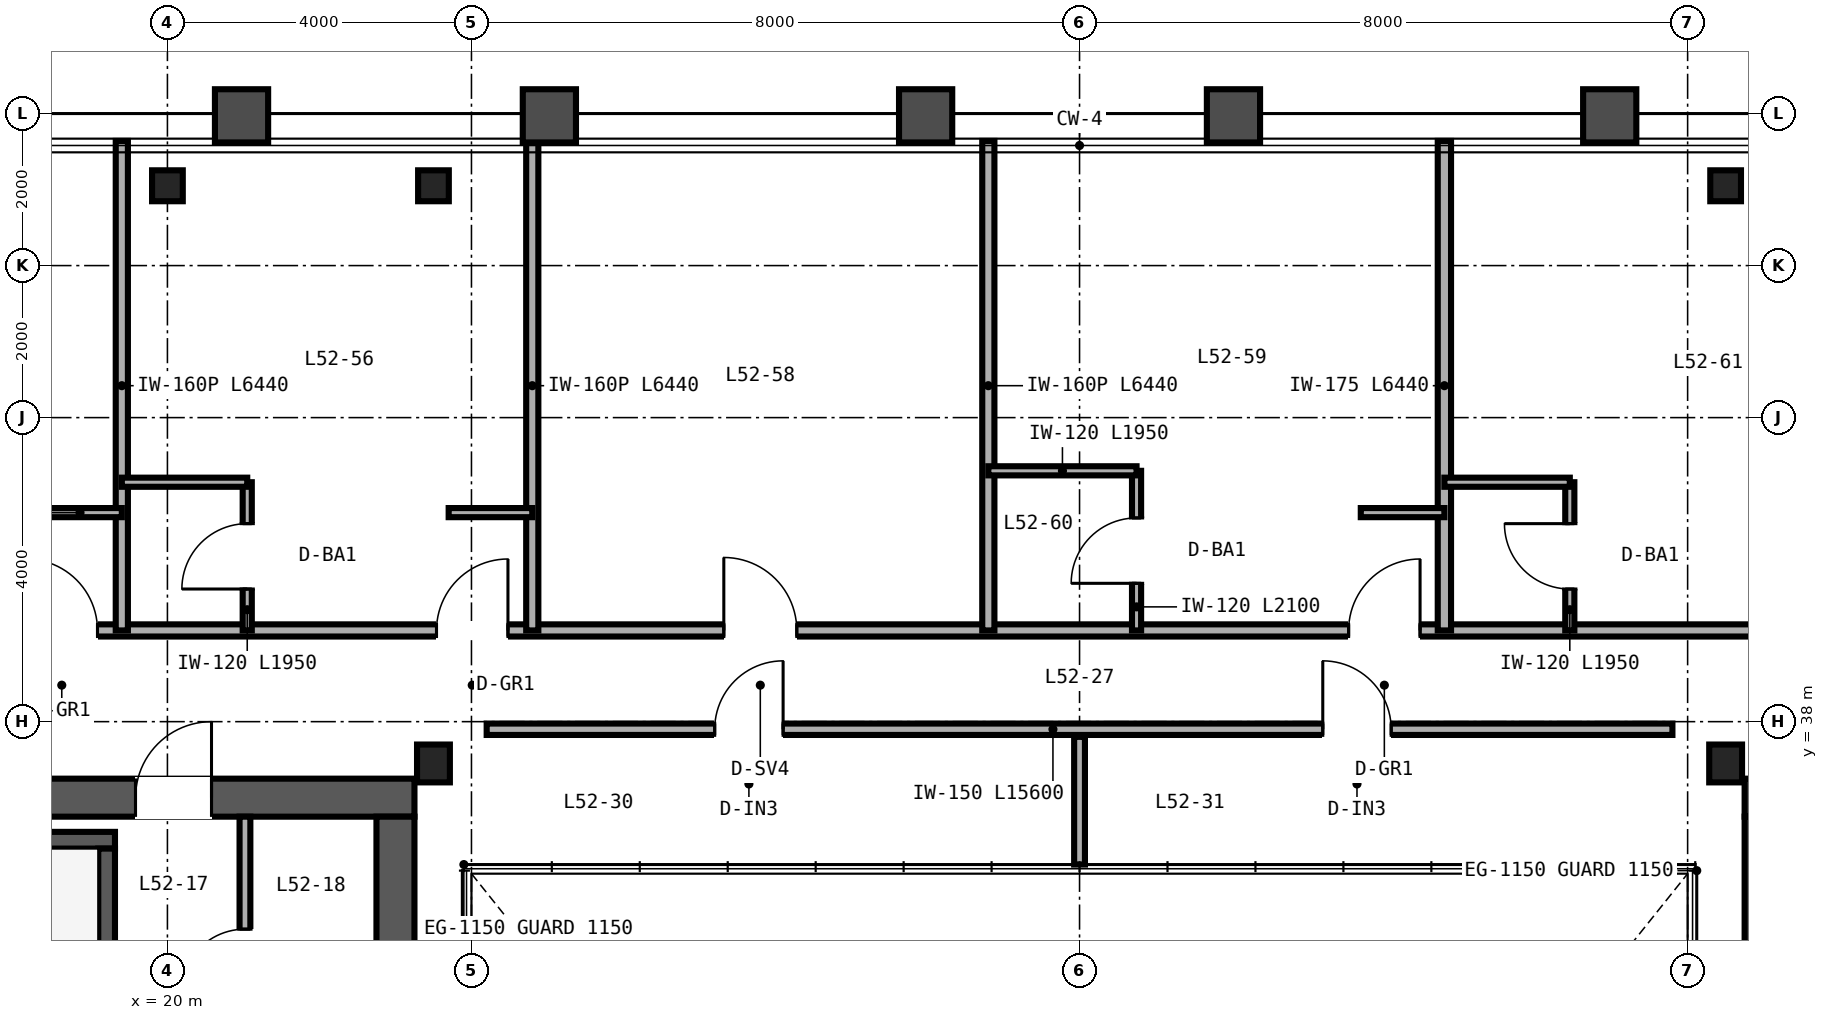
"""IFC4 building model, lengths in metres.
Left out: names, types, materials, properties, quantities, classifications, styles, units other than length and angle.
Written with IfcOpenShell. Run it as: python <this file> out.ifc"""

import sys

from ifc_helpers import new_model, si_unit, direction, frame, frame_2d, origin, origin_2d, place, context, subcontext, project, spatial, rectangle, i_section, extrude, source, transform, mapped, element, fill, save


model = new_model("IFC4")
c1 = context("Model", 3, precision=1e-05, world=origin(), true_north=direction((0.0, 1.0)))
c2 = subcontext(c1, "Body", "Model", "MODEL_VIEW")
j1 = project(units=[si_unit("LENGTHUNIT", "METRE"), si_unit("PLANEANGLEUNIT", "RADIAN")], contexts=[c1])
p1 = place(None, origin())
s1 = spatial("IfcSite", under=j1, at=p1, CompositionType="ELEMENT")
p2 = place(p1, origin())
s2 = spatial("IfcBuilding", under=s1, at=p2, CompositionType="ELEMENT")
p3 = place(p2, frame((0.0, 0.0, 206.4)))
s3 = spatial("IfcBuildingStorey", under=s2, at=p3, CompositionType="ELEMENT", Elevation=206.4)
p4 = place(p3, frame((10.75, 37.0, 0.0), z_axis=(0.0, 0.0, 1.0), x_axis=(1.0, 0.0, 0.0)))
e1 = element("IfcWall", 1, at=p4, inside=s3, PredefinedType="SHEAR", context=c2, shape_type="SweptSolid", body=[
    extrude(rectangle(XDim=12.5, YDim=0.5, at=frame_2d((6.25, 0.0))), origin(), (0.0, 0.0, 1.0), 3.37),
])
p5 = place(p4, frame((8.83, 0.0, 0.0)))
e2 = element("IfcOpeningElement", 2, at=p5, cuts=e1, PredefinedType="OPENING", context=c2, shape_type="SweptSolid", body=[
    extrude(rectangle(XDim=1.0, YDim=2.15, at=frame_2d((0.5, 1.075))), frame((0.0, 0.26, 0.0), z_axis=(0.0, -1.0, 0.0), x_axis=(1.0, 0.0, 0.0)), (0.0, 0.0, 1.0), 0.52),
])
p6 = place(p3, frame((23.0, 15.25, 0.0), z_axis=(0.0, 0.0, 1.0), x_axis=(0.0, 1.0, 0.0)))
e3 = element("IfcWall", 3, at=p6, inside=s3, PredefinedType="SHEAR", context=c2, shape_type="SweptSolid", body=[
    extrude(rectangle(XDim=21.5, YDim=0.5, at=frame_2d((10.75, 0.0))), origin(), (0.0, 0.0, 1.0), 3.37),
])
p7 = place(p3, frame((40.75, 37.0, 0.0), z_axis=(0.0, 0.0, 1.0), x_axis=(1.0, 0.0, 0.0)))
e4 = element("IfcWall", 4, at=p7, inside=s3, PredefinedType="SHEAR", context=c2, shape_type="SweptSolid", body=[
    extrude(rectangle(XDim=12.5, YDim=0.5, at=frame_2d((6.25, 0.0))), origin(), (0.0, 0.0, 1.0), 3.37),
])
p8 = place(p7, frame((9.95, 0.0, 0.0)))
e5 = element("IfcOpeningElement", 5, at=p8, cuts=e4, PredefinedType="OPENING", context=c2, shape_type="SweptSolid", body=[
    extrude(rectangle(XDim=1.1, YDim=2.15, at=frame_2d((0.55, 1.075))), frame((0.0, 0.26, 0.0), z_axis=(0.0, -1.0, 0.0), x_axis=(1.0, 0.0, 0.0)), (0.0, 0.0, 1.0), 0.52),
])
p9 = place(p3, frame((41.0, 15.25, 0.0), z_axis=(0.0, 0.0, 1.0), x_axis=(0.0, 1.0, 0.0)))
e6 = element("IfcWall", 6, at=p9, inside=s3, PredefinedType="SHEAR", context=c2, shape_type="SweptSolid", body=[
    extrude(rectangle(XDim=21.5, YDim=0.5, at=frame_2d((10.75, 0.0))), origin(), (0.0, 0.0, 1.0), 3.37),
])
p10 = place(p3, frame((11.25, 36.44, 0.0), z_axis=(0.0, 0.0, 1.0), x_axis=(1.0, 0.0, 0.0)))
e7 = element("IfcWall", 7, at=p10, inside=s3, PredefinedType="SHEAR", context=c2, shape_type="SweptSolid", body=[
    extrude(rectangle(XDim=8.06, YDim=0.22, at=frame_2d((4.03, 0.0))), origin(), (0.0, 0.0, 1.0), 3.4),
])
p11 = place(p3, frame((19.2, 33.05, 0.0), z_axis=(0.0, 0.0, 1.0), x_axis=(0.0, 1.0, 0.0)))
e8 = element("IfcWall", 8, at=p11, inside=s3, PredefinedType="SHEAR", context=c2, shape_type="SweptSolid", body=[
    extrude(rectangle(XDim=3.28, YDim=0.22, at=frame_2d((1.64, 0.0))), origin(), (0.0, 0.0, 1.0), 3.4),
])
m1 = source(origin(), c2, "Body", "SweptSolid", [
    extrude(i_section(OverallWidth=0.432, OverallDepth=0.498, WebThickness=0.056, FlangeThickness=0.089, FilletRadius=0.025, at=origin_2d()), origin(), (0.0, 0.0, 1.0), 3.37),
])
for number, where, z_axis, x_axis in (
    (9, (23.5, 37.45, 0.0), (0.0, 0.0, 1.0), (1.0, 0.0, 0.0)),
    (10, (40.5, 37.45, 0.0), (0.0, 0.0, 1.0), (1.0, 0.0, 0.0)),
):
    element("IfcColumn", number, at=place(p3, frame(where, z_axis=z_axis, x_axis=x_axis)), inside=s3, PredefinedType="COLUMN", context=c2, shape_type="MappedRepresentation", body=[
        mapped(m1, transform((0.0, 0.0, 0.0), scale=1.0)),
    ])
m2 = source(origin(), c2, "Body", "SweptSolid", [
    extrude(i_section(OverallWidth=0.404, OverallDepth=0.407, WebThickness=0.027, FlangeThickness=0.044, FilletRadius=0.025, at=origin_2d()), origin(), (0.0, 0.0, 1.0), 3.37),
])
for number, where, z_axis, x_axis in (
    (11, (20.0, 45.05, 0.0), (0.0, 0.0, 1.0), (1.0, 0.0, 0.0)),
    (12, (23.5, 45.05, 0.0), (0.0, 0.0, 1.0), (1.0, 0.0, 0.0)),
    (13, (40.5, 45.05, 0.0), (0.0, 0.0, 1.0), (1.0, 0.0, 0.0)),
):
    element("IfcColumn", number, at=place(p3, frame(where, z_axis=z_axis, x_axis=x_axis)), inside=s3, PredefinedType="COLUMN", context=c2, shape_type="MappedRepresentation", body=[
        mapped(m2, transform((0.0, 0.0, 0.0), scale=1.0)),
    ])
p12 = place(p3, frame((21.02, 33.28, 0.0), z_axis=(0.0, 0.0, 1.0), x_axis=(0.0, 1.0, 0.0)))
e14 = element("IfcWall", 14, at=p12, inside=s3, PredefinedType="PARTITIONING", context=c2, shape_type="SweptSolid", body=[
    extrude(rectangle(XDim=3.47, YDim=0.142, at=frame_2d((1.735, 0.0))), origin(), (0.0, 0.0, 1.0), 3.37),
])
p13 = place(p12, frame((1.15, 0.0, 0.0)))
e15 = element("IfcOpeningElement", 15, at=p13, cuts=e14, PredefinedType="OPENING", context=c2, shape_type="SweptSolid", body=[
    extrude(rectangle(XDim=0.84, YDim=2.1, at=frame_2d((0.42, 1.05))), frame((0.0, 0.081, 0.0), z_axis=(0.0, -1.0, 0.0), x_axis=(1.0, 0.0, 0.0)), (0.0, 0.0, 1.0), 0.162),
])
p14 = place(p3, frame((24.2, 37.9, 0.0), z_axis=(0.0, 0.0, 1.0), x_axis=(1.0, 0.0, 0.0)))
e16 = element("IfcWall", 16, at=p14, inside=s3, PredefinedType="PARTITIONING", context=c2, shape_type="SweptSolid", body=[
    extrude(rectangle(XDim=15.6, YDim=0.15, at=frame_2d((7.8, 0.0))), origin(), (0.0, 0.0, 1.0), 3.37),
])
p15 = place(p14, frame((3.0, 0.0, 0.0)))
e17 = element("IfcOpeningElement", 17, at=p15, cuts=e16, PredefinedType="OPENING", context=c2, shape_type="SweptSolid", body=[
    extrude(rectangle(XDim=0.9, YDim=2.15, at=frame_2d((0.45, 1.075))), frame((0.0, 0.085, 0.0), z_axis=(0.0, -1.0, 0.0), x_axis=(1.0, 0.0, 0.0)), (0.0, 0.0, 1.0), 0.17),
])
p16 = place(p14, frame((11.0, 0.0, 0.0)))
e18 = element("IfcOpeningElement", 18, at=p16, cuts=e16, PredefinedType="OPENING", context=c2, shape_type="SweptSolid", body=[
    extrude(rectangle(XDim=0.9, YDim=2.15, at=frame_2d((0.45, 1.075))), frame((0.0, 0.085, 0.0), z_axis=(0.0, -1.0, 0.0), x_axis=(1.0, 0.0, 0.0)), (0.0, 0.0, 1.0), 0.17),
])
p17 = place(p3, frame((32.0, 36.12, 0.0), z_axis=(0.0, 0.0, 1.0), x_axis=(0.0, 1.0, 0.0)))
e19 = element("IfcWall", 19, at=p17, inside=s3, PredefinedType="PARTITIONING", context=c2, shape_type="SweptSolid", body=[
    extrude(rectangle(XDim=1.68, YDim=0.142, at=frame_2d((0.84, 0.0))), origin(), (0.0, 0.0, 1.0), 3.37),
])
p18 = place(p3, frame((14.0, 39.2, 0.0), z_axis=(0.0, 0.0, 1.0), x_axis=(1.0, 0.0, 0.0)))
e20 = element("IfcWall", 20, at=p18, inside=s3, PredefinedType="PARTITIONING", context=c2, shape_type="SweptSolid", body=[
    extrude(rectangle(XDim=36.0, YDim=0.16, at=frame_2d((18.0, 0.0))), origin(), (0.0, 0.0, 1.0), 2.913),
])
p19 = place(p18, frame((4.14, 0.0, 0.0)))
e21 = element("IfcOpeningElement", 21, at=p19, cuts=e20, PredefinedType="OPENING", context=c2, shape_type="SweptSolid", body=[
    extrude(rectangle(XDim=0.94, YDim=2.15, at=frame_2d((0.47, 1.075))), frame((0.0, 0.09, 0.0), z_axis=(0.0, -1.0, 0.0), x_axis=(1.0, 0.0, 0.0)), (0.0, 0.0, 1.0), 0.18),
])
p20 = place(p18, frame((9.54, 0.0, 0.0)))
e22 = element("IfcOpeningElement", 22, at=p20, cuts=e20, PredefinedType="OPENING", context=c2, shape_type="SweptSolid", body=[
    extrude(rectangle(XDim=0.94, YDim=2.15, at=frame_2d((0.47, 1.075))), frame((0.0, 0.09, 0.0), z_axis=(0.0, -1.0, 0.0), x_axis=(1.0, 0.0, 0.0)), (0.0, 0.0, 1.0), 0.18),
])
p21 = place(p18, frame((13.32, 0.0, 0.0)))
e23 = element("IfcOpeningElement", 23, at=p21, cuts=e20, PredefinedType="OPENING", context=c2, shape_type="SweptSolid", body=[
    extrude(rectangle(XDim=0.96, YDim=2.15, at=frame_2d((0.48, 1.075))), frame((0.0, 0.09, 0.0), z_axis=(0.0, -1.0, 0.0), x_axis=(1.0, 0.0, 0.0)), (0.0, 0.0, 1.0), 0.18),
])
p22 = place(p18, frame((21.54, 0.0, 0.0)))
e24 = element("IfcOpeningElement", 24, at=p22, cuts=e20, PredefinedType="OPENING", context=c2, shape_type="SweptSolid", body=[
    extrude(rectangle(XDim=0.94, YDim=2.15, at=frame_2d((0.47, 1.075))), frame((0.0, 0.09, 0.0), z_axis=(0.0, -1.0, 0.0), x_axis=(1.0, 0.0, 0.0)), (0.0, 0.0, 1.0), 0.18),
])
p23 = place(p18, frame((28.14, 0.0, 0.0)))
e25 = element("IfcOpeningElement", 25, at=p23, cuts=e20, PredefinedType="OPENING", context=c2, shape_type="SweptSolid", body=[
    extrude(rectangle(XDim=0.94, YDim=2.15, at=frame_2d((0.47, 1.075))), frame((0.0, 0.09, 0.0), z_axis=(0.0, -1.0, 0.0), x_axis=(1.0, 0.0, 0.0)), (0.0, 0.0, 1.0), 0.18),
])
p24 = place(p18, frame((34.74, 0.0, 0.0)))
e26 = element("IfcOpeningElement", 26, at=p24, cuts=e20, PredefinedType="OPENING", context=c2, shape_type="SweptSolid", body=[
    extrude(rectangle(XDim=0.94, YDim=2.15, at=frame_2d((0.47, 1.075))), frame((0.0, 0.09, 0.0), z_axis=(0.0, -1.0, 0.0), x_axis=(1.0, 0.0, 0.0)), (0.0, 0.0, 1.0), 0.18),
])
p25 = place(p3, frame((19.4, 39.2, 0.0), z_axis=(0.0, 0.0, 1.0), x_axis=(0.0, 1.0, 0.0)))
e27 = element("IfcWall", 27, at=p25, inside=s3, PredefinedType="PARTITIONING", context=c2, shape_type="SweptSolid", body=[
    extrude(rectangle(XDim=6.44, YDim=0.16, at=frame_2d((3.22, 0.0))), origin(), (0.0, 0.0, 1.0), 2.677),
])
p26 = place(p3, frame((18.3, 40.75, 0.0), z_axis=(0.0, 0.0, 1.0), x_axis=(1.0, 0.0, 0.0)))
e28 = element("IfcWall", 28, at=p26, inside=s3, PredefinedType="PARTITIONING", context=c2, shape_type="SweptSolid", body=[
    extrude(rectangle(XDim=1.1, YDim=0.12, at=frame_2d((0.55, 0.0))), origin(), (0.0, 0.0, 1.0), 3.37),
])
p27 = place(p3, frame((24.8, 39.2, 0.0), z_axis=(0.0, 0.0, 1.0), x_axis=(0.0, 1.0, 0.0)))
e29 = element("IfcWall", 29, at=p27, inside=s3, PredefinedType="PARTITIONING", context=c2, shape_type="SweptSolid", body=[
    extrude(rectangle(XDim=6.44, YDim=0.16, at=frame_2d((3.22, 0.0))), origin(), (0.0, 0.0, 1.0), 2.443),
])
p28 = place(p3, frame((21.05, 39.2, 0.0), z_axis=(0.0, 0.0, 1.0), x_axis=(0.0, 1.0, 0.0)))
e30 = element("IfcWall", 30, at=p28, inside=s3, PredefinedType="PARTITIONING", context=c2, shape_type="SweptSolid", body=[
    extrude(rectangle(XDim=1.95, YDim=0.12, at=frame_2d((0.975, 0.0))), origin(), (0.0, 0.0, 1.0), 3.37),
])
p29 = place(p28, frame((0.545, 0.0, 0.0)))
e31 = element("IfcOpeningElement", 31, at=p29, cuts=e30, PredefinedType="OPENING", context=c2, shape_type="SweptSolid", body=[
    extrude(rectangle(XDim=0.86, YDim=2.1, at=frame_2d((0.43, 1.05))), frame((0.0, 0.07, 0.0), z_axis=(0.0, -1.0, 0.0), x_axis=(1.0, 0.0, 0.0)), (0.0, 0.0, 1.0), 0.14),
])
p30 = place(p3, frame((19.4, 41.15, 0.0), z_axis=(0.0, 0.0, 1.0), x_axis=(1.0, 0.0, 0.0)))
e32 = element("IfcWall", 32, at=p30, inside=s3, PredefinedType="PARTITIONING", context=c2, shape_type="SweptSolid", body=[
    extrude(rectangle(XDim=1.65, YDim=0.12, at=frame_2d((0.825, 0.0))), origin(), (0.0, 0.0, 1.0), 3.37),
])
p31 = place(p3, frame((23.7, 40.75, 0.0), z_axis=(0.0, 0.0, 1.0), x_axis=(1.0, 0.0, 0.0)))
e33 = element("IfcWall", 33, at=p31, inside=s3, PredefinedType="PARTITIONING", context=c2, shape_type="SweptSolid", body=[
    extrude(rectangle(XDim=1.1, YDim=0.12, at=frame_2d((0.55, 0.0))), origin(), (0.0, 0.0, 1.0), 2.913),
])
p32 = place(p3, frame((30.8, 39.2, 0.0), z_axis=(0.0, 0.0, 1.0), x_axis=(0.0, 1.0, 0.0)))
e34 = element("IfcWall", 34, at=p32, inside=s3, PredefinedType="PARTITIONING", context=c2, shape_type="SweptSolid", body=[
    extrude(rectangle(XDim=6.44, YDim=0.16, at=frame_2d((3.22, 0.0))), origin(), (0.0, 0.0, 1.0), 2.443),
])
p33 = place(p3, frame((36.8, 39.2, 0.0), z_axis=(0.0, 0.0, 1.0), x_axis=(0.0, 1.0, 0.0)))
e35 = element("IfcWall", 35, at=p33, inside=s3, PredefinedType="PARTITIONING", context=c2, shape_type="SweptSolid", body=[
    extrude(rectangle(XDim=6.44, YDim=0.175, at=frame_2d((3.22, 0.0))), origin(), (0.0, 0.0, 1.0), 2.443),
])
p34 = place(p3, frame((32.75, 39.2, 0.0), z_axis=(0.0, 0.0, 1.0), x_axis=(0.0, 1.0, 0.0)))
e36 = element("IfcWall", 36, at=p34, inside=s3, PredefinedType="PARTITIONING", context=c2, shape_type="SweptSolid", body=[
    extrude(rectangle(XDim=2.1, YDim=0.12, at=frame_2d((1.05, 0.0))), origin(), (0.0, 0.0, 1.0), 3.37),
])
p35 = place(p34, frame((0.62, 0.0, 0.0)))
e37 = element("IfcOpeningElement", 37, at=p35, cuts=e36, PredefinedType="OPENING", context=c2, shape_type="SweptSolid", body=[
    extrude(rectangle(XDim=0.86, YDim=2.1, at=frame_2d((0.43, 1.05))), frame((0.0, 0.07, 0.0), z_axis=(0.0, -1.0, 0.0), x_axis=(1.0, 0.0, 0.0)), (0.0, 0.0, 1.0), 0.14),
])
p36 = place(p3, frame((30.8, 41.3, 0.0), z_axis=(0.0, 0.0, 1.0), x_axis=(1.0, 0.0, 0.0)))
e38 = element("IfcWall", 38, at=p36, inside=s3, PredefinedType="PARTITIONING", context=c2, shape_type="SweptSolid", body=[
    extrude(rectangle(XDim=1.95, YDim=0.12, at=frame_2d((0.975, 0.0))), origin(), (0.0, 0.0, 1.0), 3.37),
])
p37 = place(p3, frame((35.7, 40.75, 0.0), z_axis=(0.0, 0.0, 1.0), x_axis=(1.0, 0.0, 0.0)))
e39 = element("IfcWall", 39, at=p37, inside=s3, PredefinedType="PARTITIONING", context=c2, shape_type="SweptSolid", body=[
    extrude(rectangle(XDim=1.1, YDim=0.12, at=frame_2d((0.55, 0.0))), origin(), (0.0, 0.0, 1.0), 3.37),
])
p38 = place(p3, frame((38.45, 39.2, 0.0), z_axis=(0.0, 0.0, 1.0), x_axis=(0.0, 1.0, 0.0)))
e40 = element("IfcWall", 40, at=p38, inside=s3, PredefinedType="PARTITIONING", context=c2, shape_type="SweptSolid", body=[
    extrude(rectangle(XDim=1.95, YDim=0.12, at=frame_2d((0.975, 0.0))), origin(), (0.0, 0.0, 1.0), 3.37),
])
p39 = place(p38, frame((0.545, 0.0, 0.0)))
e41 = element("IfcOpeningElement", 41, at=p39, cuts=e40, PredefinedType="OPENING", context=c2, shape_type="SweptSolid", body=[
    extrude(rectangle(XDim=0.86, YDim=2.1, at=frame_2d((0.43, 1.05))), frame((0.0, 0.07, 0.0), z_axis=(0.0, -1.0, 0.0), x_axis=(1.0, 0.0, 0.0)), (0.0, 0.0, 1.0), 0.14),
])
p40 = place(p3, frame((36.8, 41.15, 0.0), z_axis=(0.0, 0.0, 1.0), x_axis=(1.0, 0.0, 0.0)))
e42 = element("IfcWall", 42, at=p40, inside=s3, PredefinedType="PARTITIONING", context=c2, shape_type="SweptSolid", body=[
    extrude(rectangle(XDim=1.65, YDim=0.12, at=frame_2d((0.825, 0.0))), origin(), (0.0, 0.0, 1.0), 3.37),
])
m3 = source(origin(), c2, "Body", "SweptSolid", [
    extrude(rectangle(XDim=0.84, YDim=2.1, at=frame_2d((0.42, 1.05))), frame((0.0, 0.025, 0.0), z_axis=(0.0, -1.0, 0.0), x_axis=(1.0, 0.0, 0.0)), (0.0, 0.0, 1.0), 0.05),
])
p41 = place(p13, origin())
e43 = element("IfcDoor", 43, at=p41, inside=s3, OperationType="SINGLE_SWING_LEFT", PredefinedType="DOOR", context=c2, shape_type="MappedRepresentation", body=[
    mapped(m3, transform((0.0, 0.0, 0.0), scale=1.0)),
])
fill(e15, e43)
m4 = source(origin(), c2, "Body", "SweptSolid", [
    extrude(rectangle(XDim=1.0, YDim=2.15, at=frame_2d((0.5, 1.075))), frame((0.0, 0.025, 0.0), z_axis=(0.0, -1.0, 0.0), x_axis=(1.0, 0.0, 0.0)), (0.0, 0.0, 1.0), 0.05),
])
p42 = place(p5, origin())
e44 = element("IfcDoor", 44, at=p42, inside=s3, OperationType="SINGLE_SWING_RIGHT", PredefinedType="DOOR", context=c2, shape_type="MappedRepresentation", body=[
    mapped(m4, transform((0.0, 0.0, 0.0), scale=1.0)),
])
fill(e2, e44)
m5 = source(origin(), c2, "Body", "SweptSolid", [
    extrude(rectangle(XDim=0.9, YDim=2.15, at=frame_2d((0.45, 1.075))), frame((0.0, 0.025, 0.0), z_axis=(0.0, -1.0, 0.0), x_axis=(1.0, 0.0, 0.0)), (0.0, 0.0, 1.0), 0.05),
])
p43 = place(p15, origin())
e45 = element("IfcDoor", 45, at=p43, inside=s3, OperationType="SINGLE_SWING_RIGHT", PredefinedType="DOOR", context=c2, shape_type="MappedRepresentation", body=[
    mapped(m5, transform((0.0, 0.0, 0.0), scale=1.0)),
])
fill(e17, e45)
p44 = place(p16, origin())
e46 = element("IfcDoor", 46, at=p44, inside=s3, OperationType="SINGLE_SWING_LEFT", PredefinedType="DOOR", context=c2, shape_type="MappedRepresentation", body=[
    mapped(m5, transform((0.0, 0.0, 0.0), scale=1.0)),
])
fill(e18, e46)
m6 = source(origin(), c2, "Body", "SweptSolid", [
    extrude(rectangle(XDim=0.86, YDim=2.1, at=frame_2d((0.43, 1.05))), frame((0.0, 0.025, 0.0), z_axis=(0.0, -1.0, 0.0), x_axis=(1.0, 0.0, 0.0)), (0.0, 0.0, 1.0), 0.05),
])
p45 = place(p29, origin())
e47 = element("IfcDoor", 47, at=p45, inside=s3, OperationType="SINGLE_SWING_LEFT", PredefinedType="DOOR", context=c2, shape_type="MappedRepresentation", body=[
    mapped(m6, transform((0.0, 0.0, 0.0), scale=1.0)),
])
fill(e31, e47)
p46 = place(p35, origin())
e48 = element("IfcDoor", 48, at=p46, inside=s3, OperationType="SINGLE_SWING_LEFT", PredefinedType="DOOR", context=c2, shape_type="MappedRepresentation", body=[
    mapped(m6, transform((0.0, 0.0, 0.0), scale=1.0)),
])
fill(e37, e48)
p47 = place(p39, origin())
e49 = element("IfcDoor", 49, at=p47, inside=s3, OperationType="SINGLE_SWING_RIGHT", PredefinedType="DOOR", context=c2, shape_type="MappedRepresentation", body=[
    mapped(m6, transform((0.0, 0.0, 0.0), scale=1.0)),
])
fill(e41, e49)
m7 = source(origin(), c2, "Body", "SweptSolid", [
    extrude(rectangle(XDim=0.94, YDim=2.15, at=frame_2d((0.47, 1.075))), frame((0.0, 0.025, 0.0), z_axis=(0.0, -1.0, 0.0), x_axis=(1.0, 0.0, 0.0)), (0.0, 0.0, 1.0), 0.05),
])
p48 = place(p19, origin())
e50 = element("IfcDoor", 50, at=p48, inside=s3, OperationType="SINGLE_SWING_LEFT", PredefinedType="DOOR", context=c2, shape_type="MappedRepresentation", body=[
    mapped(m7, transform((0.0, 0.0, 0.0), scale=1.0)),
])
fill(e21, e50)
p49 = place(p20, origin())
e51 = element("IfcDoor", 51, at=p49, inside=s3, OperationType="SINGLE_SWING_RIGHT", PredefinedType="DOOR", context=c2, shape_type="MappedRepresentation", body=[
    mapped(m7, transform((0.0, 0.0, 0.0), scale=1.0)),
])
fill(e22, e51)
m8 = source(origin(), c2, "Body", "SweptSolid", [
    extrude(rectangle(XDim=0.96, YDim=2.15, at=frame_2d((0.48, 1.075))), frame((0.0, 0.025, 0.0), z_axis=(0.0, -1.0, 0.0), x_axis=(1.0, 0.0, 0.0)), (0.0, 0.0, 1.0), 0.05),
])
p50 = place(p21, origin())
e52 = element("IfcDoor", 52, at=p50, inside=s3, OperationType="SINGLE_SWING_LEFT", PredefinedType="DOOR", context=c2, shape_type="MappedRepresentation", body=[
    mapped(m8, transform((0.0, 0.0, 0.0), scale=1.0)),
])
fill(e23, e52)
p51 = place(p22, origin())
e53 = element("IfcDoor", 53, at=p51, inside=s3, OperationType="SINGLE_SWING_RIGHT", PredefinedType="DOOR", context=c2, shape_type="MappedRepresentation", body=[
    mapped(m7, transform((0.0, 0.0, 0.0), scale=1.0)),
])
fill(e24, e53)
save(model, sys.argv[1])
